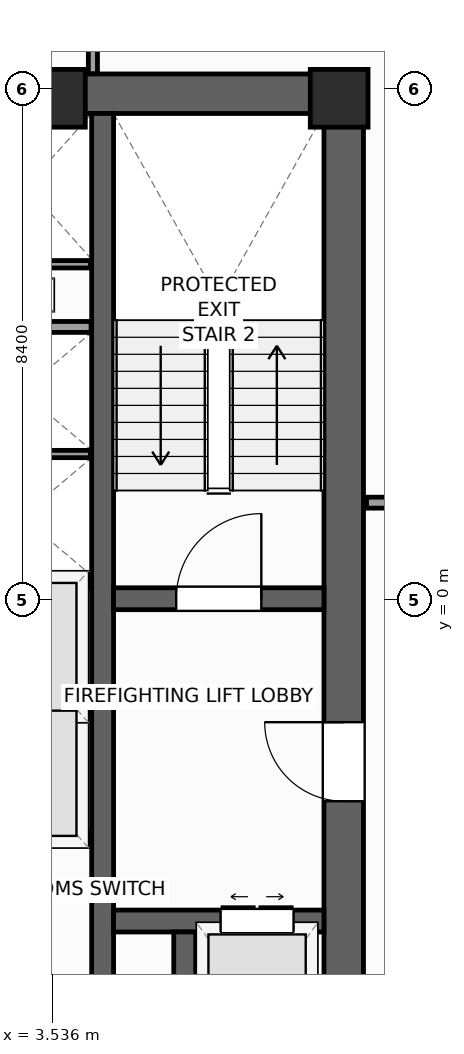
"""IFC4 building model, lengths in metres.
Left out: names, types, materials, properties, quantities, classifications, styles, units other than length and angle.
Written with IfcOpenShell. Run it as: python <this file> out.ifc"""

import sys

from ifc_helpers import new_model, si_unit, direction, frame, frame_2d, origin, origin_2d, place, context, subcontext, project, spatial, rectangle, extrude, source, transform, mapped, element, fill, save


model = new_model("IFC4")
c1 = context("Model", 3, precision=1e-05, world=origin(), true_north=direction((0.0, 1.0)))
c2 = subcontext(c1, "Body", "Model", "MODEL_VIEW")
j1 = project(units=[si_unit("LENGTHUNIT", "METRE"), si_unit("PLANEANGLEUNIT", "RADIAN")], contexts=[c1])
p1 = place(None, origin())
s1 = spatial("IfcSite", under=j1, at=p1, CompositionType="ELEMENT")
p2 = place(p1, origin())
s2 = spatial("IfcBuilding", under=s1, at=p2, CompositionType="ELEMENT")
p3 = place(p2, frame((0.0, 0.0, 168.4)))
s3 = spatial("IfcBuildingStorey", under=s2, at=p3, CompositionType="ELEMENT", Elevation=168.4)
p4 = place(p3, frame((-8.65, 8.325, 0.0), z_axis=(0.0, 0.0, 1.0), x_axis=(1.0, 0.0, 0.0)))
e1 = element("IfcWall", 1, at=p4, inside=s3, PredefinedType="SHEAR", context=c2, shape_type="SweptSolid", body=[
    extrude(rectangle(XDim=17.3, YDim=0.65, at=frame_2d((8.65, 0.0))), origin(), (0.0, 0.0, 1.0), 4.0),
])
p5 = place(p3, frame((8.325, -8.0, 0.0), z_axis=(0.0, 0.0, 1.0), x_axis=(0.0, 1.0, 0.0)))
e2 = element("IfcWall", 2, at=p5, inside=s3, PredefinedType="SHEAR", context=c2, shape_type="SweptSolid", body=[
    extrude(rectangle(XDim=16.0, YDim=0.65, at=frame_2d((8.0, 0.0))), origin(), (0.0, 0.0, 1.0), 4.0),
])
p6 = place(p5, frame((4.69, 0.0, 0.0)))
e3 = element("IfcOpeningElement", 3, at=p6, cuts=e2, PredefinedType="OPENING", context=c2, shape_type="SweptSolid", body=[
    extrude(rectangle(XDim=1.3, YDim=2.2, at=frame_2d((0.65, 1.1))), frame((0.0, 0.335, 0.0), z_axis=(0.0, -1.0, 0.0), x_axis=(1.0, 0.0, 0.0)), (0.0, 0.0, 1.0), 0.67),
])
p7 = place(p3, frame((4.36, -8.0, 0.0), z_axis=(0.0, 0.0, 1.0), x_axis=(0.0, 1.0, 0.0)))
e4 = element("IfcWall", 4, at=p7, inside=s3, PredefinedType="SHEAR", context=c2, shape_type="SweptSolid", body=[
    extrude(rectangle(XDim=16.0, YDim=0.36, at=frame_2d((8.0, 0.0))), origin(), (0.0, 0.0, 1.0), 4.0),
])
p8 = place(p3, frame((4.54, 0.02, 0.0), z_axis=(0.0, 0.0, 1.0), x_axis=(1.0, 0.0, 0.0)))
e5 = element("IfcWall", 5, at=p8, inside=s3, PredefinedType="SHEAR", context=c2, shape_type="SweptSolid", body=[
    extrude(rectangle(XDim=3.46, YDim=0.36, at=frame_2d((1.73, 0.0))), origin(), (0.0, 0.0, 1.0), 4.0),
])
p9 = place(p8, frame((1.03, 0.0, 0.0)))
e6 = element("IfcOpeningElement", 6, at=p9, cuts=e5, PredefinedType="OPENING", context=c2, shape_type="SweptSolid", body=[
    extrude(rectangle(XDim=1.4, YDim=2.2, at=frame_2d((0.7, 1.1))), frame((0.0, 0.19, 0.0), z_axis=(0.0, -1.0, 0.0), x_axis=(1.0, 0.0, 0.0)), (0.0, 0.0, 1.0), 0.38),
])
p10 = place(p3, frame((4.54, -5.28, 0.0), z_axis=(0.0, 0.0, 1.0), x_axis=(1.0, 0.0, 0.0)))
e7 = element("IfcWall", 7, at=p10, inside=s3, PredefinedType="SHEAR", context=c2, shape_type="SweptSolid", body=[
    extrude(rectangle(XDim=3.46, YDim=0.36, at=frame_2d((1.73, 0.0))), origin(), (0.0, 0.0, 1.0), 4.0),
])
p11 = place(p10, frame((1.76, 0.0, 0.0)))
e8 = element("IfcOpeningElement", 8, at=p11, cuts=e7, PredefinedType="OPENING", context=c2, shape_type="SweptSolid", body=[
    extrude(rectangle(XDim=1.2, YDim=2.25, at=frame_2d((0.6, 1.125))), frame((0.0, 0.19, 0.0), z_axis=(0.0, -1.0, 0.0), x_axis=(1.0, 0.0, 0.0)), (0.0, 0.0, 1.0), 0.38),
])
p12 = place(p3, frame((5.71, -8.0, 0.0), z_axis=(0.0, 0.0, 1.0), x_axis=(0.0, 1.0, 0.0)))
e9 = element("IfcWall", 9, at=p12, inside=s3, PredefinedType="SHEAR", context=c2, shape_type="SweptSolid", body=[
    extrude(rectangle(XDim=2.54, YDim=0.36, at=frame_2d((1.27, 0.0))), origin(), (0.0, 0.0, 1.0), 4.0),
])
m1 = source(origin(), c2, "Body", "SweptSolid", [
    extrude(rectangle(XDim=0.95, YDim=0.95, at=origin_2d()), origin(), (0.0, 0.0, 1.0), 4.0),
])
for number, where, z_axis, x_axis in (
    (10, (8.25, 8.25, 0.0), (0.0, 0.0, 1.0), (1.0, 0.0, 0.0)),
    (11, (3.6, 8.25, 0.0), (0.0, 0.0, 1.0), (1.0, 0.0, 0.0)),
):
    element("IfcColumn", number, at=place(p3, frame(where, z_axis=z_axis, x_axis=x_axis)), inside=s3, PredefinedType="PILASTER", context=c2, shape_type="MappedRepresentation", body=[
        mapped(m1, transform((0.0, 0.0, 0.0), scale=1.0)),
    ])
for number, where, z_axis, x_axis in (
    (12, (1.89, -3.9, 0.0), (0.0, 0.0, 1.0), (1.0, 0.0, 0.0)),
    (13, (1.89, 0.3, 0.0), (0.0, 0.0, 1.0), (1.0, 0.0, 0.0)),
    (14, (1.89, 4.49, 0.0), (0.0, 0.0, 1.0), (1.0, 0.0, 0.0)),
):
    element("IfcWall", number, at=place(p3, frame(where, z_axis=z_axis, x_axis=x_axis)), inside=s3, PredefinedType="PARTITIONING", context=c2, shape_type="SweptSolid", body=[
        extrude(rectangle(XDim=2.28, YDim=0.18, at=frame_2d((1.14, 0.0))), origin(), (0.0, 0.0, 1.0), 3.74),
    ])
for number, where, z_axis, x_axis in (
    (15, (1.9, -1.8, 0.0), (0.0, 0.0, 1.0), (1.0, 0.0, 0.0)),
    (16, (1.9, 2.4, 0.0), (0.0, 0.0, 1.0), (1.0, 0.0, 0.0)),
):
    element("IfcWall", number, at=place(p3, frame(where, z_axis=z_axis, x_axis=x_axis)), inside=s3, PredefinedType="PARTITIONING", context=c2, shape_type="SweptSolid", body=[
        extrude(rectangle(XDim=2.26, YDim=0.12, at=frame_2d((1.13, 0.0))), origin(), (0.0, 0.0, 1.0), 3.74),
    ])
p13 = place(p3, frame((2.06, 5.52, 0.0), z_axis=(0.0, 0.0, 1.0), x_axis=(1.0, 0.0, 0.0)))
e17 = element("IfcWall", 17, at=p13, inside=s3, PredefinedType="PARTITIONING", context=c2, shape_type="SweptSolid", body=[
    extrude(rectangle(XDim=2.1, YDim=0.12, at=frame_2d((1.05, 0.0))), origin(), (0.0, 0.0, 1.0), 3.74),
])
p14 = place(p3, frame((8.7, 1.6, 0.0), z_axis=(0.0, 0.0, 1.0), x_axis=(1.0, 0.0, 0.0)))
e18 = element("IfcWall", 18, at=p14, inside=s3, PredefinedType="PARTITIONING", context=c2, shape_type="SweptSolid", body=[
    extrude(rectangle(XDim=2.9, YDim=0.18, at=frame_2d((1.45, 0.0))), origin(), (0.0, 0.0, 1.0), 3.74),
])
p15 = place(p14, frame((0.9, 0.0, 0.0)))
e19 = element("IfcOpeningElement", 19, at=p15, cuts=e18, PredefinedType="OPENING", context=c2, shape_type="SweptSolid", body=[
    extrude(rectangle(XDim=1.1, YDim=2.2, at=frame_2d((0.55, 1.1))), frame((0.0, 0.1, 0.0), z_axis=(0.0, -1.0, 0.0), x_axis=(1.0, 0.0, 0.0)), (0.0, 0.0, 1.0), 0.2),
])
p16 = place(p3, frame((4.2, 8.655, 0.0), z_axis=(0.0, 0.0, 1.0), x_axis=(0.0, 1.0, 0.0)))
e20 = element("IfcWall", 20, at=p16, inside=s3, PredefinedType="PARTITIONING", context=c2, shape_type="SweptSolid", body=[
    extrude(rectangle(XDim=21.286, YDim=0.15, at=frame_2d((10.643, 0.0))), origin(), (0.0, 0.0, 1.0), 3.74),
])
m2 = source(origin(), c2, "Body", "SweptSolid", [
    extrude(rectangle(XDim=1.4, YDim=2.2, at=frame_2d((0.7, 1.1))), frame((0.0, 0.025, 0.0), z_axis=(0.0, -1.0, 0.0), x_axis=(1.0, 0.0, 0.0)), (0.0, 0.0, 1.0), 0.05),
])
p17 = place(p9, origin())
e21 = element("IfcDoor", 21, at=p17, inside=s3, OperationType="SINGLE_SWING_RIGHT", PredefinedType="DOOR", context=c2, shape_type="MappedRepresentation", body=[
    mapped(m2, transform((0.0, 0.0, 0.0), scale=1.0)),
])
fill(e6, e21)
m3 = source(origin(), c2, "Body", "SweptSolid", [
    extrude(rectangle(XDim=1.3, YDim=2.2, at=frame_2d((0.65, 1.1))), frame((0.0, 0.025, 0.0), z_axis=(0.0, -1.0, 0.0), x_axis=(1.0, 0.0, 0.0)), (0.0, 0.0, 1.0), 0.05),
])
p18 = place(p6, origin())
e22 = element("IfcDoor", 22, at=p18, inside=s3, OperationType="SINGLE_SWING_RIGHT", PredefinedType="DOOR", context=c2, shape_type="MappedRepresentation", body=[
    mapped(m3, transform((0.0, 0.0, 0.0), scale=1.0)),
])
fill(e3, e22)
m4 = source(origin(), c2, "Body", "SweptSolid", [
    extrude(rectangle(XDim=1.2, YDim=2.25, at=frame_2d((0.6, 1.125))), frame((0.0, 0.025, 0.0), z_axis=(0.0, -1.0, 0.0), x_axis=(1.0, 0.0, 0.0)), (0.0, 0.0, 1.0), 0.05),
])
p19 = place(p11, origin())
e23 = element("IfcDoor", 23, at=p19, inside=s3, OperationType="DOUBLE_DOOR_SLIDING", PredefinedType="DOOR", context=c2, shape_type="MappedRepresentation", body=[
    mapped(m4, transform((0.0, 0.0, 0.0), scale=1.0)),
])
fill(e8, e23)
save(model, sys.argv[1])
